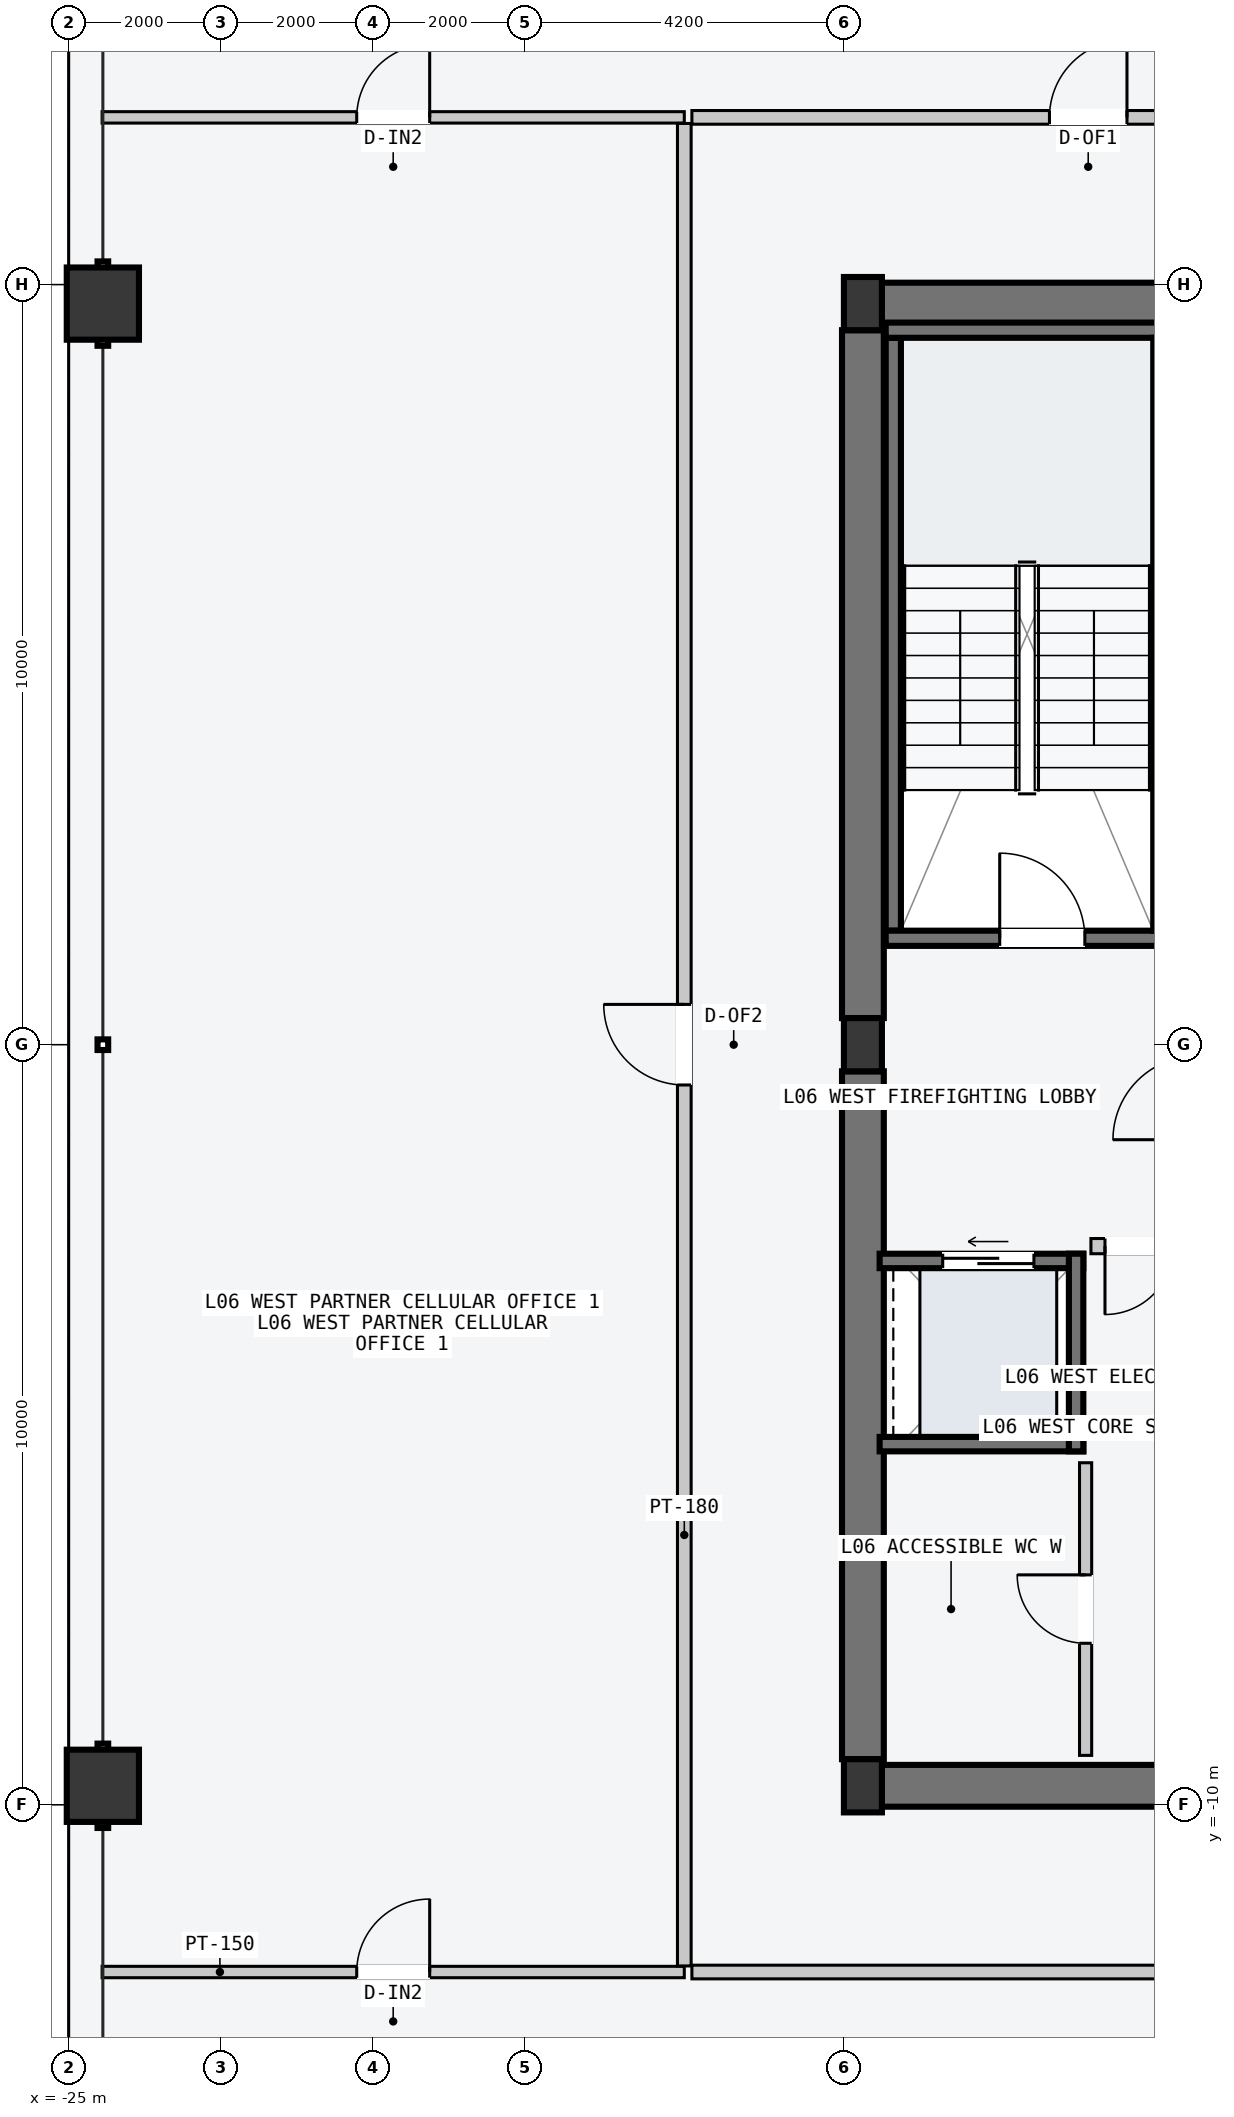
"""IFC4 building model, lengths in metres.
Left out: names, types, materials, properties, quantities, classifications, styles, units other than length and angle.
Written with IfcOpenShell. Run it as: python <this file> out.ifc"""

import sys

from ifc_helpers import new_model, si_unit, direction, frame, frame_2d, origin, origin_2d, place, context, subcontext, project, spatial, rectangle, hollow_rectangle, i_section, extrude, element, fill, save


model = new_model("IFC4")
c1 = context("Model", 3, precision=1e-05, world=origin(), true_north=direction((0.0, 1.0)))
c2 = subcontext(c1, "Body", "Model", "MODEL_VIEW")
j1 = project(units=[si_unit("LENGTHUNIT", "METRE"), si_unit("PLANEANGLEUNIT", "RADIAN")], contexts=[c1])
p1 = place(None, origin())
s1 = spatial("IfcSite", under=j1, at=p1, CompositionType="ELEMENT")
p2 = place(p1, origin())
s2 = spatial("IfcBuilding", under=s1, at=p2, CompositionType="ELEMENT")
p3 = place(p2, frame((0.0, 0.0, 27.6)))
s3 = spatial("IfcBuildingStorey", under=s2, at=p3, CompositionType="ELEMENT", Elevation=27.6)
for number, where, z_axis, x_axis in (
    (1, (-14.53, -9.75, -0.2), (0.0, 0.0, 1.0), (1.0, 0.0, 0.0)),
    (2, (-14.53, 9.75, -0.2), (0.0, 0.0, 1.0), (1.0, 0.0, 0.0)),
):
    element("IfcWall", number, at=place(p3, frame(where, z_axis=z_axis, x_axis=x_axis)), inside=s3, PredefinedType="SHEAR", context=c2, shape_type="SweptSolid", body=[
        extrude(rectangle(XDim=6.46, YDim=0.55, at=frame_2d((3.23, 0.0))), origin(), (0.0, 0.0, 1.0), 3.6),
    ])
for number, where, z_axis, x_axis in (
    (3, (-14.55, -9.4, -0.2), (0.0, 0.0, 1.0), (0.0, 1.0, 0.0)),
    (4, (-14.55, 0.35, -0.2), (0.0, 0.0, 1.0), (0.0, 1.0, 0.0)),
):
    element("IfcWall", number, at=place(p3, frame(where, z_axis=z_axis, x_axis=x_axis)), inside=s3, PredefinedType="SHEAR", context=c2, shape_type="SweptSolid", body=[
        extrude(rectangle(XDim=9.05, YDim=0.55, at=frame_2d((4.525, 0.0))), origin(), (0.0, 0.0, 1.0), 3.6),
    ])
p4 = place(p3, frame((-14.15, 1.5, -0.2), z_axis=(0.0, 0.0, 1.0), x_axis=(0.0, 1.0, 0.0)))
e5 = element("IfcWall", 5, at=p4, inside=s3, PredefinedType="SOLIDWALL", context=c2, shape_type="SweptSolid", body=[
    extrude(rectangle(XDim=7.8, YDim=0.2, at=frame_2d((3.9, 0.0))), origin(), (0.0, 0.0, 1.0), 3.6),
])
p5 = place(p3, frame((-14.25, 1.4, -0.2), z_axis=(0.0, 0.0, 1.0), x_axis=(1.0, 0.0, 0.0)))
e6 = element("IfcWall", 6, at=p5, inside=s3, PredefinedType="SOLIDWALL", context=c2, shape_type="SweptSolid", body=[
    extrude(rectangle(XDim=4.1, YDim=0.2, at=frame_2d((2.05, 0.0))), origin(), (0.0, 0.0, 1.0), 3.6),
])
p6 = place(p5, frame((1.5, 0.0, 0.2)))
e7 = element("IfcOpeningElement", 7, at=p6, cuts=e6, PredefinedType="OPENING", context=c2, shape_type="SweptSolid", body=[
    extrude(rectangle(XDim=1.12, YDim=2.18, at=frame_2d((0.56, 1.09))), frame((0.0, 0.11, 0.0), z_axis=(0.0, -1.0, 0.0), x_axis=(1.0, 0.0, 0.0)), (0.0, 0.0, 1.0), 0.22),
])
p7 = place(p3, frame((-14.25, 9.4, -0.2), z_axis=(0.0, 0.0, 1.0), x_axis=(1.0, 0.0, 0.0)))
e8 = element("IfcWall", 8, at=p7, inside=s3, PredefinedType="SOLIDWALL", context=c2, shape_type="SweptSolid", body=[
    extrude(rectangle(XDim=4.1, YDim=0.2, at=frame_2d((2.05, 0.0))), origin(), (0.0, 0.0, 1.0), 3.6),
])
p8 = place(p3, frame((-10.63, 1.5, -0.2), z_axis=(0.0, 0.0, 1.0), x_axis=(0.0, 1.0, 0.0)))
e9 = element("IfcWall", 9, at=p8, inside=s3, PredefinedType="SOLIDWALL", context=c2, shape_type="SweptSolid", body=[
    extrude(rectangle(XDim=7.8, YDim=0.2, at=frame_2d((3.9, 0.0))), origin(), (0.0, 0.0, 1.0), 3.6),
])
for number, where, z_axis, x_axis in (
    (10, (-14.55, -9.75, 0.0), (0.0, 0.0, 1.0), (1.0, 0.0, 0.0)),
    (11, (-14.55, 0.0, 0.0), (0.0, 0.0, 1.0), (1.0, 0.0, 0.0)),
    (12, (-14.55, 9.75, 0.0), (0.0, 0.0, 1.0), (1.0, 0.0, 0.0)),
):
    element("IfcColumn", number, at=place(p3, frame(where, z_axis=z_axis, x_axis=x_axis)), inside=s3, PredefinedType="COLUMN", context=c2, shape_type="SweptSolid", body=[
        extrude(i_section(OverallWidth=0.5, OverallDepth=0.7, WebThickness=0.028, FlangeThickness=0.045, at=origin_2d()), origin(), (0.0, 0.0, 1.0), 3.6),
    ])
for number, where, z_axis, x_axis in (
    (13, (-24.55, -9.75, 0.0), (0.0, 0.0, 1.0), (0.0, 1.0, 0.0)),
    (14, (-24.55, 9.75, 0.0), (0.0, 0.0, 1.0), (0.0, 1.0, 0.0)),
):
    element("IfcColumn", number, at=place(p3, frame(where, z_axis=z_axis, x_axis=x_axis)), inside=s3, PredefinedType="COLUMN", context=c2, shape_type="SweptSolid", body=[
        extrude(hollow_rectangle(XDim=0.95, YDim=0.95, WallThickness=0.048, at=origin_2d()), origin(), (0.0, 0.0, 1.0), 3.6),
    ])
p9 = place(p3, frame((-14.33, -2.845, -0.2), z_axis=(0.0, 0.0, 1.0), x_axis=(1.0, 0.0, 0.0)))
e15 = element("IfcWall", 15, at=p9, inside=s3, PredefinedType="SOLIDWALL", context=c2, shape_type="SweptSolid", body=[
    extrude(rectangle(XDim=2.68, YDim=0.19, at=frame_2d((1.34, 0.0))), origin(), (0.0, 0.0, 1.0), 3.6),
])
p10 = place(p9, frame((0.83, 0.0, 0.2)))
e16 = element("IfcOpeningElement", 16, at=p10, cuts=e15, PredefinedType="OPENING", context=c2, shape_type="SweptSolid", body=[
    extrude(rectangle(XDim=1.2, YDim=2.2, at=frame_2d((0.6, 1.1))), frame((0.0, 0.105, 0.0), z_axis=(0.0, -1.0, 0.0), x_axis=(1.0, 0.0, 0.0)), (0.0, 0.0, 1.0), 0.21),
])
p11 = place(p3, frame((-14.33, -5.255, -0.2), z_axis=(0.0, 0.0, 1.0), x_axis=(1.0, 0.0, 0.0)))
e17 = element("IfcWall", 17, at=p11, inside=s3, PredefinedType="SOLIDWALL", context=c2, shape_type="SweptSolid", body=[
    extrude(rectangle(XDim=2.68, YDim=0.19, at=frame_2d((1.34, 0.0))), origin(), (0.0, 0.0, 1.0), 3.6),
])
p12 = place(p3, frame((-11.745, -5.35, -0.2), z_axis=(0.0, 0.0, 1.0), x_axis=(0.0, 1.0, 0.0)))
e18 = element("IfcWall", 18, at=p12, inside=s3, PredefinedType="SOLIDWALL", context=c2, shape_type="SweptSolid", body=[
    extrude(rectangle(XDim=2.6, YDim=0.19, at=frame_2d((1.3, 0.0))), origin(), (0.0, 0.0, 1.0), 3.6),
])
p13 = place(p3, frame((-10.28, -2.65, 0.0), z_axis=(0.0, 0.0, 1.0), x_axis=(-1.0, 0.0, 0.0)))
e19 = element("IfcWall", 19, at=p13, inside=s3, PredefinedType="PARTITIONING", context=c2, shape_type="SweptSolid", body=[
    extrude(rectangle(XDim=1.27, YDim=0.2, at=frame_2d((0.635, 0.0))), origin(), (0.0, 0.0, 1.0), 3.4),
])
p14 = place(p13, frame((0.185, 0.0, 0.0)))
e20 = element("IfcOpeningElement", 20, at=p14, cuts=e19, PredefinedType="OPENING", context=c2, shape_type="SweptSolid", body=[
    extrude(rectangle(XDim=0.9, YDim=2.15, at=frame_2d((0.45, 1.075))), frame((0.0, 0.11, 0.0), z_axis=(0.0, -1.0, 0.0), x_axis=(1.0, 0.0, 0.0)), (0.0, 0.0, 1.0), 0.22),
])
p15 = place(p3, frame((-11.62, -9.35, 0.0), z_axis=(0.0, 0.0, 1.0), x_axis=(0.0, 1.0, 0.0)))
e21 = element("IfcWall", 21, at=p15, inside=s3, PredefinedType="PARTITIONING", context=c2, shape_type="SweptSolid", body=[
    extrude(rectangle(XDim=3.85, YDim=0.16, at=frame_2d((1.925, 0.0))), origin(), (0.0, 0.0, 1.0), 3.4),
])
p16 = place(p15, frame((1.475, 0.0, 0.0)))
e22 = element("IfcOpeningElement", 22, at=p16, cuts=e21, PredefinedType="OPENING", context=c2, shape_type="SweptSolid", body=[
    extrude(rectangle(XDim=0.9, YDim=2.15, at=frame_2d((0.45, 1.075))), frame((0.0, 0.09, 0.0), z_axis=(0.0, -1.0, 0.0), x_axis=(1.0, 0.0, 0.0)), (0.0, 0.0, 1.0), 0.18),
])
p17 = place(p3, frame((-16.8, 12.2, 0.0), z_axis=(0.0, 0.0, 1.0), x_axis=(1.0, 0.0, 0.0)))
e23 = element("IfcWall", 23, at=p17, inside=s3, PredefinedType="PARTITIONING", context=c2, shape_type="SweptSolid", body=[
    extrude(rectangle(XDim=33.6, YDim=0.18, at=frame_2d((16.8, 0.0))), origin(), (0.0, 0.0, 1.0), 3.4),
])
p18 = place(p17, frame((4.704, 0.0, 0.0)))
e24 = element("IfcOpeningElement", 24, at=p18, cuts=e23, PredefinedType="OPENING", context=c2, shape_type="SweptSolid", body=[
    extrude(rectangle(XDim=1.02, YDim=2.2, at=frame_2d((0.51, 1.1))), frame((0.0, 0.1, 0.0), z_axis=(0.0, -1.0, 0.0), x_axis=(1.0, 0.0, 0.0)), (0.0, 0.0, 1.0), 0.2),
])
p19 = place(p17, frame((21.484, 0.0, 0.0)))
e25 = element("IfcOpeningElement", 25, at=p19, cuts=e23, PredefinedType="OPENING", context=c2, shape_type="SweptSolid", body=[
    extrude(rectangle(XDim=1.06, YDim=2.2, at=frame_2d((0.53, 1.1))), frame((0.0, 0.1, 0.0), z_axis=(0.0, -1.0, 0.0), x_axis=(1.0, 0.0, 0.0)), (0.0, 0.0, 1.0), 0.2),
])
p20 = place(p3, frame((-24.56, 12.2, 0.0), z_axis=(0.0, 0.0, 1.0), x_axis=(1.0, 0.0, 0.0)))
e26 = element("IfcWall", 26, at=p20, inside=s3, PredefinedType="PARTITIONING", context=c2, shape_type="SweptSolid", body=[
    extrude(rectangle(XDim=7.66, YDim=0.15, at=frame_2d((3.83, 0.0))), origin(), (0.0, 0.0, 1.0), 3.4),
])
p21 = place(p20, frame((3.35, 0.0, 0.0)))
e27 = element("IfcOpeningElement", 27, at=p21, cuts=e26, PredefinedType="OPENING", context=c2, shape_type="SweptSolid", body=[
    extrude(rectangle(XDim=0.96, YDim=2.18, at=frame_2d((0.48, 1.09))), frame((0.0, 0.085, 0.0), z_axis=(0.0, -1.0, 0.0), x_axis=(1.0, 0.0, 0.0)), (0.0, 0.0, 1.0), 0.17),
])
p22 = place(p3, frame((-16.8, -12.2, 0.0), z_axis=(0.0, 0.0, 1.0), x_axis=(1.0, 0.0, 0.0)))
e28 = element("IfcWall", 28, at=p22, inside=s3, PredefinedType="PARTITIONING", context=c2, shape_type="SweptSolid", body=[
    extrude(rectangle(XDim=33.6, YDim=0.18, at=frame_2d((16.8, 0.0))), origin(), (0.0, 0.0, 1.0), 3.4),
])
p23 = place(p22, frame((6.505, 0.0, 0.0)))
e29 = element("IfcOpeningElement", 29, at=p23, cuts=e28, PredefinedType="OPENING", context=c2, shape_type="SweptSolid", body=[
    extrude(rectangle(XDim=1.4, YDim=2.2, at=frame_2d((0.7, 1.1))), frame((0.0, 0.1, 0.0), z_axis=(0.0, -1.0, 0.0), x_axis=(1.0, 0.0, 0.0)), (0.0, 0.0, 1.0), 0.2),
])
p24 = place(p22, frame((20.133, 0.0, 0.0)))
e30 = element("IfcOpeningElement", 30, at=p24, cuts=e28, PredefinedType="OPENING", context=c2, shape_type="SweptSolid", body=[
    extrude(rectangle(XDim=0.9, YDim=2.15, at=frame_2d((0.45, 1.075))), frame((0.0, 0.1, 0.0), z_axis=(0.0, -1.0, 0.0), x_axis=(1.0, 0.0, 0.0)), (0.0, 0.0, 1.0), 0.2),
])
p25 = place(p22, frame((29.698, 0.0, 0.0)))
e31 = element("IfcOpeningElement", 31, at=p25, cuts=e28, PredefinedType="OPENING", context=c2, shape_type="SweptSolid", body=[
    extrude(rectangle(XDim=0.96, YDim=2.18, at=frame_2d((0.48, 1.09))), frame((0.0, 0.1, 0.0), z_axis=(0.0, -1.0, 0.0), x_axis=(1.0, 0.0, 0.0)), (0.0, 0.0, 1.0), 0.2),
])
p26 = place(p3, frame((-24.56, -12.2, 0.0), z_axis=(0.0, 0.0, 1.0), x_axis=(1.0, 0.0, 0.0)))
e32 = element("IfcWall", 32, at=p26, inside=s3, PredefinedType="PARTITIONING", context=c2, shape_type="SweptSolid", body=[
    extrude(rectangle(XDim=7.66, YDim=0.15, at=frame_2d((3.83, 0.0))), origin(), (0.0, 0.0, 1.0), 3.4),
])
p27 = place(p26, frame((3.35, 0.0, 0.0)))
e33 = element("IfcOpeningElement", 33, at=p27, cuts=e32, PredefinedType="OPENING", context=c2, shape_type="SweptSolid", body=[
    extrude(rectangle(XDim=0.96, YDim=2.18, at=frame_2d((0.48, 1.09))), frame((0.0, 0.085, 0.0), z_axis=(0.0, -1.0, 0.0), x_axis=(1.0, 0.0, 0.0)), (0.0, 0.0, 1.0), 0.17),
])
p28 = place(p3, frame((-16.9, -12.12, 0.0), z_axis=(0.0, 0.0, 1.0), x_axis=(0.0, 1.0, 0.0)))
e34 = element("IfcWall", 34, at=p28, inside=s3, PredefinedType="PARTITIONING", context=c2, shape_type="SweptSolid", body=[
    extrude(rectangle(XDim=24.24, YDim=0.18, at=frame_2d((12.12, 0.0))), origin(), (0.0, 0.0, 1.0), 3.4),
])
p29 = place(p28, frame((11.59, 0.0, 0.0)))
e35 = element("IfcOpeningElement", 35, at=p29, cuts=e34, PredefinedType="OPENING", context=c2, shape_type="SweptSolid", body=[
    extrude(rectangle(XDim=1.06, YDim=2.2, at=frame_2d((0.53, 1.1))), frame((0.0, 0.1, 0.0), z_axis=(0.0, -1.0, 0.0), x_axis=(1.0, 0.0, 0.0)), (0.0, 0.0, 1.0), 0.2),
])
p30 = place(p6, origin())
e36 = element("IfcDoor", 36, at=p30, inside=s3, OperationType="SINGLE_SWING_LEFT", PredefinedType="DOOR", context=c2, shape_type="SweptSolid", body=[
    extrude(rectangle(XDim=1.12, YDim=2.18, at=frame_2d((0.56, 1.09))), frame((0.0, 0.025, 0.0), z_axis=(0.0, -1.0, 0.0), x_axis=(1.0, 0.0, 0.0)), (0.0, 0.0, 1.0), 0.05),
])
fill(e7, e36)
p31 = place(p10, origin())
e37 = element("IfcDoor", 37, at=p31, inside=s3, OperationType="SLIDING_TO_LEFT", PredefinedType="DOOR", context=c2, shape_type="SweptSolid", body=[
    extrude(rectangle(XDim=1.2, YDim=2.2, at=frame_2d((0.6, 1.1))), frame((0.0, 0.025, 0.0), z_axis=(0.0, -1.0, 0.0), x_axis=(1.0, 0.0, 0.0)), (0.0, 0.0, 1.0), 0.05),
])
fill(e16, e37)
p32 = place(p14, origin())
e38 = element("IfcDoor", 38, at=p32, inside=s3, OperationType="SINGLE_SWING_RIGHT", PredefinedType="DOOR", context=c2, shape_type="SweptSolid", body=[
    extrude(rectangle(XDim=0.9, YDim=2.15, at=frame_2d((0.45, 1.075))), frame((0.0, 0.025, 0.0), z_axis=(0.0, -1.0, 0.0), x_axis=(1.0, 0.0, 0.0)), (0.0, 0.0, 1.0), 0.05),
])
fill(e20, e38)
p33 = place(p16, origin())
e39 = element("IfcDoor", 39, at=p33, inside=s3, OperationType="SINGLE_SWING_RIGHT", PredefinedType="DOOR", context=c2, shape_type="SweptSolid", body=[
    extrude(rectangle(XDim=0.9, YDim=2.15, at=frame_2d((0.45, 1.075))), frame((0.0, 0.025, 0.0), z_axis=(0.0, -1.0, 0.0), x_axis=(1.0, 0.0, 0.0)), (0.0, 0.0, 1.0), 0.05),
])
fill(e22, e39)
p34 = place(p18, origin())
e40 = element("IfcDoor", 40, at=p34, inside=s3, OperationType="SINGLE_SWING_RIGHT", PredefinedType="DOOR", context=c2, shape_type="SweptSolid", body=[
    extrude(rectangle(XDim=1.02, YDim=2.2, at=frame_2d((0.51, 1.1))), frame((0.0, 0.025, 0.0), z_axis=(0.0, -1.0, 0.0), x_axis=(1.0, 0.0, 0.0)), (0.0, 0.0, 1.0), 0.05),
])
fill(e24, e40)
p35 = place(p21, origin())
e41 = element("IfcDoor", 41, at=p35, inside=s3, OperationType="SINGLE_SWING_RIGHT", PredefinedType="DOOR", context=c2, shape_type="SweptSolid", body=[
    extrude(rectangle(XDim=0.96, YDim=2.18, at=frame_2d((0.48, 1.09))), frame((0.0, 0.025, 0.0), z_axis=(0.0, -1.0, 0.0), x_axis=(1.0, 0.0, 0.0)), (0.0, 0.0, 1.0), 0.05),
])
fill(e27, e41)
p36 = place(p27, origin())
e42 = element("IfcDoor", 42, at=p36, inside=s3, OperationType="SINGLE_SWING_RIGHT", PredefinedType="DOOR", context=c2, shape_type="SweptSolid", body=[
    extrude(rectangle(XDim=0.96, YDim=2.18, at=frame_2d((0.48, 1.09))), frame((0.0, 0.025, 0.0), z_axis=(0.0, -1.0, 0.0), x_axis=(1.0, 0.0, 0.0)), (0.0, 0.0, 1.0), 0.05),
])
fill(e33, e42)
p37 = place(p29, origin())
e43 = element("IfcDoor", 43, at=p37, inside=s3, OperationType="SINGLE_SWING_RIGHT", PredefinedType="DOOR", context=c2, shape_type="SweptSolid", body=[
    extrude(rectangle(XDim=1.06, YDim=2.2, at=frame_2d((0.53, 1.1))), frame((0.0, 0.025, 0.0), z_axis=(0.0, -1.0, 0.0), x_axis=(1.0, 0.0, 0.0)), (0.0, 0.0, 1.0), 0.05),
])
fill(e35, e43)
save(model, sys.argv[1])
